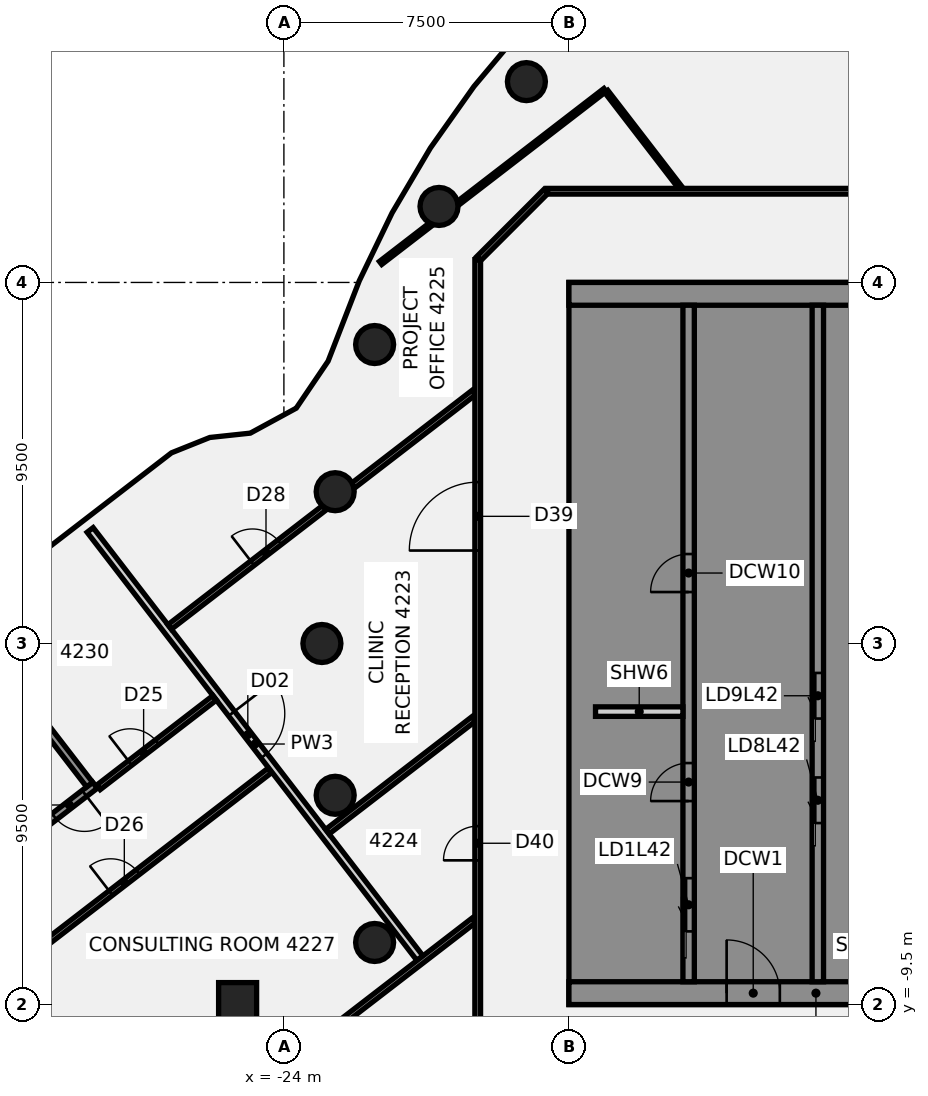
"""IFC4 building model, lengths in metres.
Left out: names, types, materials, properties, quantities, classifications, styles, units other than length and angle.
Written with IfcOpenShell. Run it as: python <this file> out.ifc"""

import sys

from ifc_helpers import new_model, si_unit, direction, frame, frame_2d, origin, origin_2d, place, context, subcontext, project, spatial, polyline, rectangle, circle, outline, extrude, element, fill, save


model = new_model("IFC4")
c1 = context("Model", 3, precision=1e-05, world=origin(), true_north=direction((0.0, 1.0)))
c2 = subcontext(c1, "Body", "Model", "MODEL_VIEW")
j1 = project(units=[si_unit("LENGTHUNIT", "METRE"), si_unit("PLANEANGLEUNIT", "RADIAN")], contexts=[c1])
p1 = place(None, origin())
s1 = spatial("IfcSite", under=j1, at=p1, CompositionType="ELEMENT")
p2 = place(p1, origin())
s2 = spatial("IfcBuilding", under=s1, at=p2, CompositionType="ELEMENT")
p3 = place(p2, frame((0.0, 0.0, 170.5)))
s3 = spatial("IfcBuildingStorey", under=s2, at=p3, CompositionType="ELEMENT", Elevation=170.5)
for number, where, z_axis, x_axis in (
    (1, (-17.619, 14.784, -0.14), (0.0, 0.0, 1.0), (1.0, 0.0, 0.0)),
    (2, (-19.919, 11.5, -0.14), (0.0, 0.0, 1.0), (1.0, 0.0, 0.0)),
    (3, (-21.613, 7.866, -0.14), (0.0, 0.0, 1.0), (1.0, 0.0, 0.0)),
    (4, (-22.651, 3.994, -0.14), (0.0, 0.0, 1.0), (1.0, 0.0, 0.0)),
    (5, (-23.0, 0.0, -0.14), (0.0, 0.0, 1.0), (1.0, 0.0, 0.0)),
    (6, (-22.651, -3.994, -0.14), (0.0, 0.0, 1.0), (1.0, 0.0, 0.0)),
    (7, (-21.613, -7.866, -0.14), (0.0, 0.0, 1.0), (1.0, 0.0, 0.0)),
):
    element("IfcColumn", number, at=place(p3, frame(where, z_axis=z_axis, x_axis=x_axis)), inside=s3, PredefinedType="COLUMN", context=c2, shape_type="SweptSolid", body=[
        extrude(circle(Radius=0.5, at=origin_2d()), origin(), (0.0, 0.0, 1.0), 3.75),
    ])
p4 = place(p3, frame((-25.218, -9.423, -0.139), z_axis=(0.045877682669, -0.015162411435, 0.99883198763), x_axis=(-0.610036224661, 0.791361600627, 0.04003275727)))
e8 = element("IfcColumn", 8, at=p4, inside=s3, PredefinedType="COLUMN", context=c2, shape_type="SweptSolid", body=[
    extrude(rectangle(XDim=1.0, YDim=1.0, at=origin_2d()), origin(), (0.0, 0.0, 1.0), 3.752),
])
p5 = place(p3, frame((-29.099, 2.988, 0.0), z_axis=(0.0, 0.0, 1.0), x_axis=(0.610216796322, -0.792234473806, 0.0)))
e9 = element("IfcWall", 9, at=p5, inside=s3, PredefinedType="PARTITIONING", context=c2, shape_type="SweptSolid", body=[
    extrude(rectangle(XDim=14.219, YDim=0.2, at=frame_2d((7.11, 0.0))), origin(), (0.0, 0.0, 1.0), 3.01),
])
p6 = place(p5, frame((6.099, 0.0, 0.0)))
e10 = element("IfcOpeningElement", 10, at=p6, cuts=e9, PredefinedType="OPENING", context=c2, shape_type="SweptSolid", body=[
    extrude(rectangle(XDim=1.4, YDim=2.1, at=frame_2d((0.7, 1.05))), frame((0.0, 0.11, 0.0), z_axis=(0.0, -1.0, 0.0), x_axis=(1.0, 0.0, 0.0)), (0.0, 0.0, 1.0), 0.22),
])
p7 = place(p3, frame((-15.518, 14.525, 0.0), z_axis=(0.0, 0.0, 1.0), x_axis=(0.610299736782, -0.792170582188, 0.0)))
e11 = element("IfcWall", 11, at=p7, inside=s3, PredefinedType="PARTITIONING", context=c2, shape_type="SweptSolid", body=[
    extrude(rectangle(XDim=3.204, YDim=0.1, at=frame_2d((1.602, 0.0))), origin(), (0.0, 0.0, 1.0), 3.01),
])
p8 = place(p3, frame((-10.42, 23.072, 0.0), z_axis=(0.0, 0.0, 1.0), x_axis=(0.61034802643, -0.792133376795, 0.0)))
e12 = element("IfcWall", 12, at=p8, inside=s3, PredefinedType="PARTITIONING", context=c2, shape_type="SweptSolid", body=[
    extrude(rectangle(XDim=13.974, YDim=0.15, at=frame_2d((6.987, 0.0))), origin(), (0.0, 0.0, 1.0), 3.01),
])
p9 = place(p3, frame((-17.065, 11.9, 0.0), z_axis=(0.0, 0.0, 1.0), x_axis=(1.0, 0.0, 0.0)))
e13 = element("IfcWall", 13, at=p9, inside=s3, PredefinedType="PARTITIONING", context=c2, shape_type="SweptSolid", body=[
    extrude(rectangle(XDim=34.165, YDim=0.15, at=frame_2d((17.083, 0.0))), origin(), (0.0, 0.0, 1.0), 3.01),
])
p10 = place(p9, frame((22.805, 0.0, 0.0)))
e14 = element("IfcOpeningElement", 14, at=p10, cuts=e13, PredefinedType="OPENING", context=c2, shape_type="SweptSolid", body=[
    extrude(rectangle(XDim=1.8, YDim=2.1, at=frame_2d((0.9, 1.05))), frame((0.0, 0.085, 0.0), z_axis=(0.0, -1.0, 0.0), x_axis=(1.0, 0.0, 0.0)), (0.0, 0.0, 1.0), 0.17),
])
p11 = place(p9, frame((30.345, 0.0, 0.0)))
e15 = element("IfcOpeningElement", 15, at=p11, cuts=e13, PredefinedType="OPENING", context=c2, shape_type="SweptSolid", body=[
    extrude(rectangle(XDim=1.8, YDim=2.1, at=frame_2d((0.9, 1.05))), frame((0.0, 0.085, 0.0), z_axis=(0.0, -1.0, 0.0), x_axis=(1.0, 0.0, 0.0)), (0.0, 0.0, 1.0), 0.17),
])
p12 = place(p9, frame((8.52, 0.0, 0.0)))
e16 = element("IfcOpeningElement", 16, at=p12, cuts=e13, PredefinedType="OPENING", context=c2, shape_type="SweptSolid", body=[
    extrude(rectangle(XDim=1.8, YDim=2.1, at=frame_2d((0.9, 1.05))), frame((0.0, 0.085, 0.0), z_axis=(0.0, -1.0, 0.0), x_axis=(1.0, 0.0, 0.0)), (0.0, 0.0, 1.0), 0.17),
])
p13 = place(p3, frame((-28.879, -3.785, 0.0), z_axis=(0.0, 0.0, 1.0), x_axis=(0.792144001098, 0.610334237549, 0.0)))
e17 = element("IfcWall", 17, at=p13, inside=s3, PredefinedType="PARTITIONING", context=c2, shape_type="SweptSolid", body=[
    extrude(rectangle(XDim=3.859, YDim=0.15, at=frame_2d((1.93, 0.0))), origin(), (0.0, 0.0, 1.0), 3.01),
])
p14 = place(p13, frame((1.05, 0.0, 0.0)))
e18 = element("IfcOpeningElement", 18, at=p14, cuts=e17, PredefinedType="OPENING", context=c2, shape_type="SweptSolid", body=[
    extrude(rectangle(XDim=0.9, YDim=2.1, at=frame_2d((0.45, 1.05))), frame((0.0, 0.085, 0.0), z_axis=(0.0, -1.0, 0.0), x_axis=(1.0, 0.0, 0.0)), (0.0, 0.0, 1.0), 0.17),
])
p15 = place(p3, frame((-38.474, -14.207, 0.0), z_axis=(0.0, 0.0, 1.0), x_axis=(0.792120990494, 0.610364101516, 0.0)))
e19 = element("IfcWall", 19, at=p15, inside=s3, PredefinedType="PARTITIONING", context=c2, shape_type="SweptSolid", body=[
    extrude(rectangle(XDim=17.801, YDim=0.15, at=frame_2d((8.9, 0.0))), origin(), (0.0, 0.0, 1.0), 3.01),
])
p16 = place(p15, frame((12.521, 0.0, 0.0)))
e20 = element("IfcOpeningElement", 20, at=p16, cuts=e19, PredefinedType="OPENING", context=c2, shape_type="SweptSolid", body=[
    extrude(rectangle(XDim=0.9, YDim=2.1, at=frame_2d((0.45, 1.05))), frame((0.0, 0.085, 0.0), z_axis=(0.0, -1.0, 0.0), x_axis=(1.0, 0.0, 0.0)), (0.0, 0.0, 1.0), 0.17),
])
p17 = place(p15, frame((1.27, 0.0, 0.0)))
e21 = element("IfcOpeningElement", 21, at=p17, cuts=e19, PredefinedType="OPENING", context=c2, shape_type="SweptSolid", body=[
    extrude(rectangle(XDim=0.9, YDim=2.1, at=frame_2d((0.45, 1.05))), frame((0.0, 0.085, 0.0), z_axis=(0.0, -1.0, 0.0), x_axis=(1.0, 0.0, 0.0)), (0.0, 0.0, 1.0), 0.17),
])
p18 = place(p3, frame((-27.006, 0.435, 0.0), z_axis=(0.0, 0.0, 1.0), x_axis=(0.792115799785, 0.610370837877, 0.0)))
e22 = element("IfcWall", 22, at=p18, inside=s3, PredefinedType="PARTITIONING", context=c2, shape_type="SweptSolid", body=[
    extrude(rectangle(XDim=5.146, YDim=0.15, at=frame_2d((2.573, 0.0))), origin(), (0.0, 0.0, 1.0), 3.01),
])
p19 = place(p18, frame((2.75, 0.0, 0.0)))
e23 = element("IfcOpeningElement", 23, at=p19, cuts=e22, PredefinedType="OPENING", context=c2, shape_type="SweptSolid", body=[
    extrude(rectangle(XDim=0.9, YDim=2.1, at=frame_2d((0.45, 1.05))), frame((0.0, 0.085, 0.0), z_axis=(0.0, -1.0, 0.0), x_axis=(1.0, 0.0, 0.0)), (0.0, 0.0, 1.0), 0.17),
])
p20 = place(p3, frame((-22.183, 4.151, 0.0), z_axis=(0.0, 0.0, 1.0), x_axis=(0.792101467192, 0.610389437713, 0.0)))
e24 = element("IfcWall", 24, at=p20, inside=s3, PredefinedType="PARTITIONING", context=c2, shape_type="SweptSolid", body=[
    extrude(rectangle(XDim=4.015, YDim=0.15, at=frame_2d((2.007, 0.0))), origin(), (0.0, 0.0, 1.0), 3.01),
])
p21 = place(p3, frame((-23.072, -10.42, 0.0), z_axis=(0.0, 0.0, 1.0), x_axis=(0.79217677678, 0.610291696102, 0.0)))
e25 = element("IfcWall", 25, at=p21, inside=s3, PredefinedType="PARTITIONING", context=c2, shape_type="SweptSolid", body=[
    extrude(rectangle(XDim=5.137, YDim=0.15, at=frame_2d((2.568, 0.0))), origin(), (0.0, 0.0, 1.0), 3.01),
])
p22 = place(p3, frame((-22.856, -4.952, 0.0), z_axis=(0.0, 0.0, 1.0), x_axis=(0.792144175523, 0.610334011165, 0.0)))
e26 = element("IfcWall", 26, at=p22, inside=s3, PredefinedType="PARTITIONING", context=c2, shape_type="SweptSolid", body=[
    extrude(rectangle(XDim=4.864, YDim=0.15, at=frame_2d((2.432, 0.0))), origin(), (0.0, 0.0, 1.0), 3.01),
])
p23 = place(p3, frame((-21.456, 10.013, 0.0), z_axis=(0.0, 0.0, 1.0), x_axis=(0.792123801297, 0.610360453682, 0.0)))
e27 = element("IfcWall", 27, at=p23, inside=s3, PredefinedType="PARTITIONING", context=c2, shape_type="SweptSolid", body=[
    extrude(rectangle(XDim=1.688, YDim=0.1, at=frame_2d((0.844, 0.0))), origin(), (0.0, 0.0, 1.0), 3.01),
])
p24 = place(p3, frame((-19.429, 11.575, 0.0), z_axis=(0.0, 0.0, 1.0), x_axis=(0.792140202804, 0.610339167269, 0.0)))
e28 = element("IfcWall", 28, at=p24, inside=s3, PredefinedType="PARTITIONING", context=c2, shape_type="SweptSolid", body=[
    extrude(rectangle(XDim=4.899, YDim=0.1, at=frame_2d((2.449, 0.0))), origin(), (0.0, 0.0, 1.0), 3.01),
])
p25 = place(p3, frame((-18.872, 10.128, 0.0), z_axis=(0.0, 0.0, 1.0), x_axis=(0.707106781187, 0.707106781187, 0.0)))
e29 = element("IfcWall", 29, at=p25, inside=s3, PredefinedType="PARTITIONING", context=c2, shape_type="SweptSolid", body=[
    extrude(rectangle(XDim=2.505, YDim=0.15, at=frame_2d((1.253, 0.0))), origin(), (0.0, 0.0, 1.0), 3.01),
])
p26 = place(p3, frame((-18.9, -10.1, 0.0), z_axis=(0.0, 0.0, 1.0), x_axis=(0.0, 1.0, 0.0)))
e30 = element("IfcWall", 30, at=p26, inside=s3, PredefinedType="PARTITIONING", context=c2, shape_type="SweptSolid", body=[
    extrude(rectangle(XDim=20.2, YDim=0.15, at=frame_2d((10.1, 0.0))), origin(), (0.0, 0.0, 1.0), 3.01),
])
p27 = place(p26, frame((12.546, 0.0, 0.0)))
e31 = element("IfcOpeningElement", 31, at=p27, cuts=e30, PredefinedType="OPENING", context=c2, shape_type="SweptSolid", body=[
    extrude(rectangle(XDim=1.8, YDim=2.1, at=frame_2d((0.9, 1.05))), frame((0.0, 0.085, 0.0), z_axis=(0.0, -1.0, 0.0), x_axis=(1.0, 0.0, 0.0)), (0.0, 0.0, 1.0), 0.17),
])
p28 = place(p26, frame((4.394, 0.0, 0.0)))
e32 = element("IfcOpeningElement", 32, at=p28, cuts=e30, PredefinedType="OPENING", context=c2, shape_type="SweptSolid", body=[
    extrude(rectangle(XDim=0.9, YDim=2.1, at=frame_2d((0.45, 1.05))), frame((0.0, 0.085, 0.0), z_axis=(0.0, -1.0, 0.0), x_axis=(1.0, 0.0, 0.0)), (0.0, 0.0, 1.0), 0.17),
])
p29 = place(p3, frame((-16.5, -9.2, 0.0), z_axis=(0.0, 0.0, 1.0), x_axis=(1.0, 0.0, 0.0)))
e33 = element("IfcWall", 33, at=p29, inside=s3, PredefinedType="SHEAR", context=c2, shape_type="SweptSolid", body=[
    extrude(rectangle(XDim=13.0, YDim=0.6, at=frame_2d((6.5, 0.0))), origin(), (0.0, 0.0, 1.0), 3.61),
])
p30 = place(p29, frame((4.15, 0.0, 0.0)))
e34 = element("IfcOpeningElement", 34, at=p30, cuts=e33, PredefinedType="OPENING", context=c2, shape_type="SweptSolid", body=[
    extrude(rectangle(XDim=1.4, YDim=2.1, at=frame_2d((0.7, 1.05))), frame((0.0, 0.31, 0.0), z_axis=(0.0, -1.0, 0.0), x_axis=(1.0, 0.0, 0.0)), (0.0, 0.0, 1.0), 0.62),
])
p31 = place(p29, frame((10.125, 0.0, 0.0)))
e35 = element("IfcOpeningElement", 35, at=p31, cuts=e33, PredefinedType="OPENING", context=c2, shape_type="SweptSolid", body=[
    extrude(rectangle(XDim=1.4, YDim=2.1, at=frame_2d((0.7, 1.05))), frame((0.0, 0.31, 0.0), z_axis=(0.0, -1.0, 0.0), x_axis=(1.0, 0.0, 0.0)), (0.0, 0.0, 1.0), 0.62),
])
p32 = place(p3, origin())
e36 = element("IfcWall", 36, at=p32, inside=s3, PredefinedType="SHEAR", context=c2, shape_type="SweptSolid", body=[
    extrude(outline(polyline([(-13.5, -8.125), (-15.9, -8.125), (-15.9, -5.625), (-13.5, -5.625), (-13.5, -5.375), (-15.9, -5.375), (-15.9, 5.375), (-13.5, 5.375), (-13.5, 5.625), (-15.9, 5.625), (-15.9, 8.125), (-13.5, 8.125), (-13.5, 8.9), (-15.9, 8.9), (-16.5, 8.9), (-16.5, -8.9), (-15.9, -8.9), (-13.5, -8.9), (-13.5, -8.125)])), origin(), (0.0, 0.0, 1.0), 3.61),
])
p33 = place(p3, frame((-16.5, 9.2, 0.0), z_axis=(0.0, 0.0, 1.0), x_axis=(1.0, 0.0, 0.0)))
e37 = element("IfcWall", 37, at=p33, inside=s3, PredefinedType="SHEAR", context=c2, shape_type="SweptSolid", body=[
    extrude(rectangle(XDim=13.0, YDim=0.6, at=frame_2d((6.5, 0.0))), origin(), (0.0, 0.0, 1.0), 3.61),
])
p34 = place(p3, origin())
e38 = element("IfcWall", 38, at=p34, inside=s3, PredefinedType="SHEAR", context=c2, shape_type="SweptSolid", body=[
    extrude(outline(polyline([(-9.8, -5.375), (-9.8, -5.625), (-7.5, -5.625), (-7.2, -5.625), (-7.2, 8.9), (-7.5, 8.9), (-9.8, 8.9), (-9.8, 8.125), (-7.5, 8.125), (-7.5, 5.625), (-9.8, 5.625), (-9.8, 5.375), (-7.5, 5.375), (-7.5, 2.875), (-9.8, 2.875), (-9.8, 2.625), (-7.5, 2.625), (-7.5, 0.125), (-9.8, 0.125), (-9.8, -0.125), (-7.5, -0.125), (-7.5, -2.625), (-9.8, -2.625), (-9.8, -2.875), (-7.5, -2.875), (-7.5, -5.375), (-9.8, -5.375)])), origin(), (0.0, 0.0, 1.0), 3.61),
])
p35 = place(p3, origin())
e39 = element("IfcWall", 39, at=p35, inside=s3, PredefinedType="SHEAR", context=c2, shape_type="SweptSolid", body=[
    extrude(outline(polyline([(-7.5, -8.125), (-9.55, -8.125), (-9.55, -5.625), (-9.8, -5.625), (-9.8, -8.125), (-9.8, -8.9), (-7.5, -8.9), (-7.5, -8.125)])), origin(), (0.0, 0.0, 1.0), 3.61),
])
p36 = place(p3, frame((-13.35, -8.9, 0.0), z_axis=(0.0, 0.0, 1.0), x_axis=(0.0, 1.0, 0.0)))
e40 = element("IfcWall", 40, at=p36, inside=s3, PredefinedType="SHEAR", context=c2, shape_type="SweptSolid", body=[
    extrude(rectangle(XDim=17.8, YDim=0.3, at=frame_2d((8.9, 0.0))), origin(), (0.0, 0.0, 1.0), 3.61),
])
p37 = place(p36, frame((1.325, 0.0, 0.0)))
e41 = element("IfcOpeningElement", 41, at=p37, cuts=e40, PredefinedType="OPENING", context=c2, shape_type="SweptSolid", body=[
    extrude(rectangle(XDim=1.4, YDim=2.1, at=frame_2d((0.7, 1.05))), frame((0.0, 0.16, 0.0), z_axis=(0.0, -1.0, 0.0), x_axis=(1.0, 0.0, 0.0)), (0.0, 0.0, 1.0), 0.32),
])
p38 = place(p36, frame((4.754, 0.0, 0.0)))
e42 = element("IfcOpeningElement", 42, at=p38, cuts=e40, PredefinedType="OPENING", context=c2, shape_type="SweptSolid", body=[
    extrude(rectangle(XDim=1.0, YDim=2.1, at=frame_2d((0.5, 1.05))), frame((0.0, 0.16, 0.0), z_axis=(0.0, -1.0, 0.0), x_axis=(1.0, 0.0, 0.0)), (0.0, 0.0, 1.0), 0.32),
])
p39 = place(p36, frame((10.254, 0.0, 0.0)))
e43 = element("IfcOpeningElement", 43, at=p39, cuts=e40, PredefinedType="OPENING", context=c2, shape_type="SweptSolid", body=[
    extrude(rectangle(XDim=1.0, YDim=2.1, at=frame_2d((0.5, 1.05))), frame((0.0, 0.16, 0.0), z_axis=(0.0, -1.0, 0.0), x_axis=(1.0, 0.0, 0.0)), (0.0, 0.0, 1.0), 0.32),
])
p40 = place(p3, frame((-9.95, -8.9, 0.0), z_axis=(0.0, 0.0, 1.0), x_axis=(0.0, 1.0, 0.0)))
e44 = element("IfcWall", 44, at=p40, inside=s3, PredefinedType="SHEAR", context=c2, shape_type="SweptSolid", body=[
    extrude(rectangle(XDim=17.8, YDim=0.3, at=frame_2d((8.9, 0.0))), origin(), (0.0, 0.0, 1.0), 3.61),
])
p41 = place(p40, frame((4.175, 0.0, 0.0)))
e45 = element("IfcOpeningElement", 45, at=p41, cuts=e44, PredefinedType="OPENING", context=c2, shape_type="SweptSolid", body=[
    extrude(rectangle(XDim=1.2, YDim=2.1, at=frame_2d((0.6, 1.05))), frame((0.0, 0.16, 0.0), z_axis=(0.0, -1.0, 0.0), x_axis=(1.0, 0.0, 0.0)), (0.0, 0.0, 1.0), 0.32),
])
p42 = place(p40, frame((6.925, 0.0, 0.0)))
e46 = element("IfcOpeningElement", 46, at=p42, cuts=e44, PredefinedType="OPENING", context=c2, shape_type="SweptSolid", body=[
    extrude(rectangle(XDim=1.2, YDim=2.1, at=frame_2d((0.6, 1.05))), frame((0.0, 0.16, 0.0), z_axis=(0.0, -1.0, 0.0), x_axis=(1.0, 0.0, 0.0)), (0.0, 0.0, 1.0), 0.32),
])
p43 = place(p3, frame((-15.8, -1.792, 0.0), z_axis=(0.0, 0.0, 1.0), x_axis=(1.0, 0.0, 0.0)))
e47 = element("IfcWall", 47, at=p43, inside=s3, PredefinedType="PARTITIONING", context=c2, shape_type="SweptSolid", body=[
    extrude(rectangle(XDim=2.3, YDim=0.25, at=frame_2d((1.15, 0.0))), origin(), (0.0, 0.0, 1.0), 3.61),
])
p44 = place(p3, frame((-28.972, -3.731, -0.14), z_axis=(0.0, 0.0, 1.0), x_axis=(-0.792153700274, -0.610321648921, 0.0)))
e48 = element("IfcWall", 48, at=p44, inside=s3, PredefinedType="SHEAR", context=c2, shape_type="SweptSolid", body=[
    extrude(rectangle(XDim=6.7, YDim=0.2, at=frame_2d((3.35, 0.0))), origin(), (0.0, 0.0, 1.0), 3.15),
])
p45 = place(p44, frame((0.35, 0.0, 0.0)))
e49 = element("IfcOpeningElement", 49, at=p45, cuts=e48, PredefinedType="OPENING", context=c2, shape_type="SweptSolid", body=[
    extrude(rectangle(XDim=1.0, YDim=2.1, at=frame_2d((0.5, 1.05))), frame((0.0, 0.11, 0.0), z_axis=(0.0, -1.0, 0.0), x_axis=(1.0, 0.0, 0.0)), (0.0, 0.0, 1.0), 0.22),
])
p46 = place(p3, frame((-31.065, -1.177, -0.14), z_axis=(0.0, 0.0, 1.0), x_axis=(0.610289481398, -0.792178482979, 0.0)))
e50 = element("IfcWall", 50, at=p46, inside=s3, PredefinedType="SHEAR", context=c2, shape_type="SweptSolid", body=[
    extrude(rectangle(XDim=3.2, YDim=0.2, at=frame_2d((1.6, 0.0))), origin(), (0.0, 0.0, 1.0), 3.15),
])
p47 = place(p6, origin())
e51 = element("IfcDoor", 51, at=p47, inside=s3, OperationType="DOUBLE_DOOR_SINGLE_SWING", PredefinedType="DOOR", context=c2, shape_type="SweptSolid", body=[
    extrude(rectangle(XDim=1.4, YDim=2.1, at=frame_2d((0.7, 1.05))), frame((0.0, 0.025, 0.0), z_axis=(0.0, -1.0, 0.0), x_axis=(1.0, 0.0, 0.0)), (0.0, 0.0, 1.0), 0.05),
])
fill(e10, e51)
p48 = place(p14, origin())
e52 = element("IfcDoor", 52, at=p48, inside=s3, OperationType="SINGLE_SWING_RIGHT", PredefinedType="DOOR", context=c2, shape_type="SweptSolid", body=[
    extrude(rectangle(XDim=0.9, YDim=2.1, at=frame_2d((0.45, 1.05))), frame((0.0, 0.025, 0.0), z_axis=(0.0, -1.0, 0.0), x_axis=(1.0, 0.0, 0.0)), (0.0, 0.0, 1.0), 0.05),
])
fill(e18, e52)
p49 = place(p16, frame((0.9, 0.0, 0.0), z_axis=(0.0, 0.0, 1.0), x_axis=(-1.0, 0.0, 0.0)))
e53 = element("IfcDoor", 53, at=p49, inside=s3, OperationType="SINGLE_SWING_RIGHT", PredefinedType="DOOR", context=c2, shape_type="SweptSolid", body=[
    extrude(rectangle(XDim=0.9, YDim=2.1, at=frame_2d((0.45, 1.05))), frame((0.0, 0.025, 0.0), z_axis=(0.0, -1.0, 0.0), x_axis=(1.0, 0.0, 0.0)), (0.0, 0.0, 1.0), 0.05),
])
fill(e20, e53)
p50 = place(p19, origin())
e54 = element("IfcDoor", 54, at=p50, inside=s3, OperationType="SINGLE_SWING_LEFT", PredefinedType="DOOR", context=c2, shape_type="SweptSolid", body=[
    extrude(rectangle(XDim=0.9, YDim=2.1, at=frame_2d((0.45, 1.05))), frame((0.0, 0.025, 0.0), z_axis=(0.0, -1.0, 0.0), x_axis=(1.0, 0.0, 0.0)), (0.0, 0.0, 1.0), 0.05),
])
fill(e23, e54)
p51 = place(p27, frame((1.8, 0.0, 0.0), z_axis=(0.0, 0.0, 1.0), x_axis=(-1.0, 0.0, 0.0)))
e55 = element("IfcDoor", 55, at=p51, inside=s3, OperationType="DOUBLE_DOOR_SINGLE_SWING", PredefinedType="DOOR", context=c2, shape_type="SweptSolid", body=[
    extrude(rectangle(XDim=1.8, YDim=2.1, at=frame_2d((0.9, 1.05))), frame((0.0, 0.025, 0.0), z_axis=(0.0, -1.0, 0.0), x_axis=(1.0, 0.0, 0.0)), (0.0, 0.0, 1.0), 0.05),
])
fill(e31, e55)
p52 = place(p28, origin())
e56 = element("IfcDoor", 56, at=p52, inside=s3, OperationType="SINGLE_SWING_RIGHT", PredefinedType="DOOR", context=c2, shape_type="SweptSolid", body=[
    extrude(rectangle(XDim=0.9, YDim=2.1, at=frame_2d((0.45, 1.05))), frame((0.0, 0.025, 0.0), z_axis=(0.0, -1.0, 0.0), x_axis=(1.0, 0.0, 0.0)), (0.0, 0.0, 1.0), 0.05),
])
fill(e32, e56)
p53 = place(p30, origin())
e57 = element("IfcDoor", 57, at=p53, inside=s3, OperationType="SINGLE_SWING_LEFT", PredefinedType="DOOR", context=c2, shape_type="SweptSolid", body=[
    extrude(rectangle(XDim=1.4, YDim=2.1, at=frame_2d((0.7, 1.05))), frame((0.0, 0.025, 0.0), z_axis=(0.0, -1.0, 0.0), x_axis=(1.0, 0.0, 0.0)), (0.0, 0.0, 1.0), 0.05),
])
fill(e34, e57)
p54 = place(p37, origin())
e58 = element("IfcDoor", 58, at=p54, inside=s3, OperationType="SLIDING_TO_LEFT", PredefinedType="DOOR", context=c2, shape_type="SweptSolid", body=[
    extrude(rectangle(XDim=1.4, YDim=2.1, at=frame_2d((0.7, 1.05))), frame((0.0, 0.025, 0.0), z_axis=(0.0, -1.0, 0.0), x_axis=(1.0, 0.0, 0.0)), (0.0, 0.0, 1.0), 0.05),
])
fill(e41, e58)
p55 = place(p41, origin())
e59 = element("IfcDoor", 59, at=p55, inside=s3, OperationType="SLIDING_TO_LEFT", PredefinedType="DOOR", context=c2, shape_type="SweptSolid", body=[
    extrude(rectangle(XDim=1.2, YDim=2.1, at=frame_2d((0.6, 1.05))), frame((0.0, 0.025, 0.0), z_axis=(0.0, -1.0, 0.0), x_axis=(1.0, 0.0, 0.0)), (0.0, 0.0, 1.0), 0.05),
])
fill(e45, e59)
p56 = place(p42, origin())
e60 = element("IfcDoor", 60, at=p56, inside=s3, OperationType="SLIDING_TO_LEFT", PredefinedType="DOOR", context=c2, shape_type="SweptSolid", body=[
    extrude(rectangle(XDim=1.2, YDim=2.1, at=frame_2d((0.6, 1.05))), frame((0.0, 0.025, 0.0), z_axis=(0.0, -1.0, 0.0), x_axis=(1.0, 0.0, 0.0)), (0.0, 0.0, 1.0), 0.05),
])
fill(e46, e60)
p57 = place(p38, origin())
e61 = element("IfcDoor", 61, at=p57, inside=s3, OperationType="SINGLE_SWING_LEFT", PredefinedType="DOOR", context=c2, shape_type="SweptSolid", body=[
    extrude(rectangle(XDim=1.0, YDim=2.1, at=frame_2d((0.5, 1.05))), frame((0.0, 0.025, 0.0), z_axis=(0.0, -1.0, 0.0), x_axis=(1.0, 0.0, 0.0)), (0.0, 0.0, 1.0), 0.05),
])
fill(e42, e61)
p58 = place(p39, origin())
e62 = element("IfcDoor", 62, at=p58, inside=s3, OperationType="SINGLE_SWING_LEFT", PredefinedType="DOOR", context=c2, shape_type="SweptSolid", body=[
    extrude(rectangle(XDim=1.0, YDim=2.1, at=frame_2d((0.5, 1.05))), frame((0.0, 0.025, 0.0), z_axis=(0.0, -1.0, 0.0), x_axis=(1.0, 0.0, 0.0)), (0.0, 0.0, 1.0), 0.05),
])
fill(e43, e62)
p59 = place(p45, origin())
e63 = element("IfcDoor", 63, at=p59, inside=s3, OperationType="SINGLE_SWING_LEFT", PredefinedType="DOOR", context=c2, shape_type="SweptSolid", body=[
    extrude(rectangle(XDim=1.0, YDim=2.1, at=frame_2d((0.5, 1.05))), frame((0.0, 0.025, 0.0), z_axis=(0.0, -1.0, 0.0), x_axis=(1.0, 0.0, 0.0)), (0.0, 0.0, 1.0), 0.05),
])
fill(e49, e63)
save(model, sys.argv[1])
